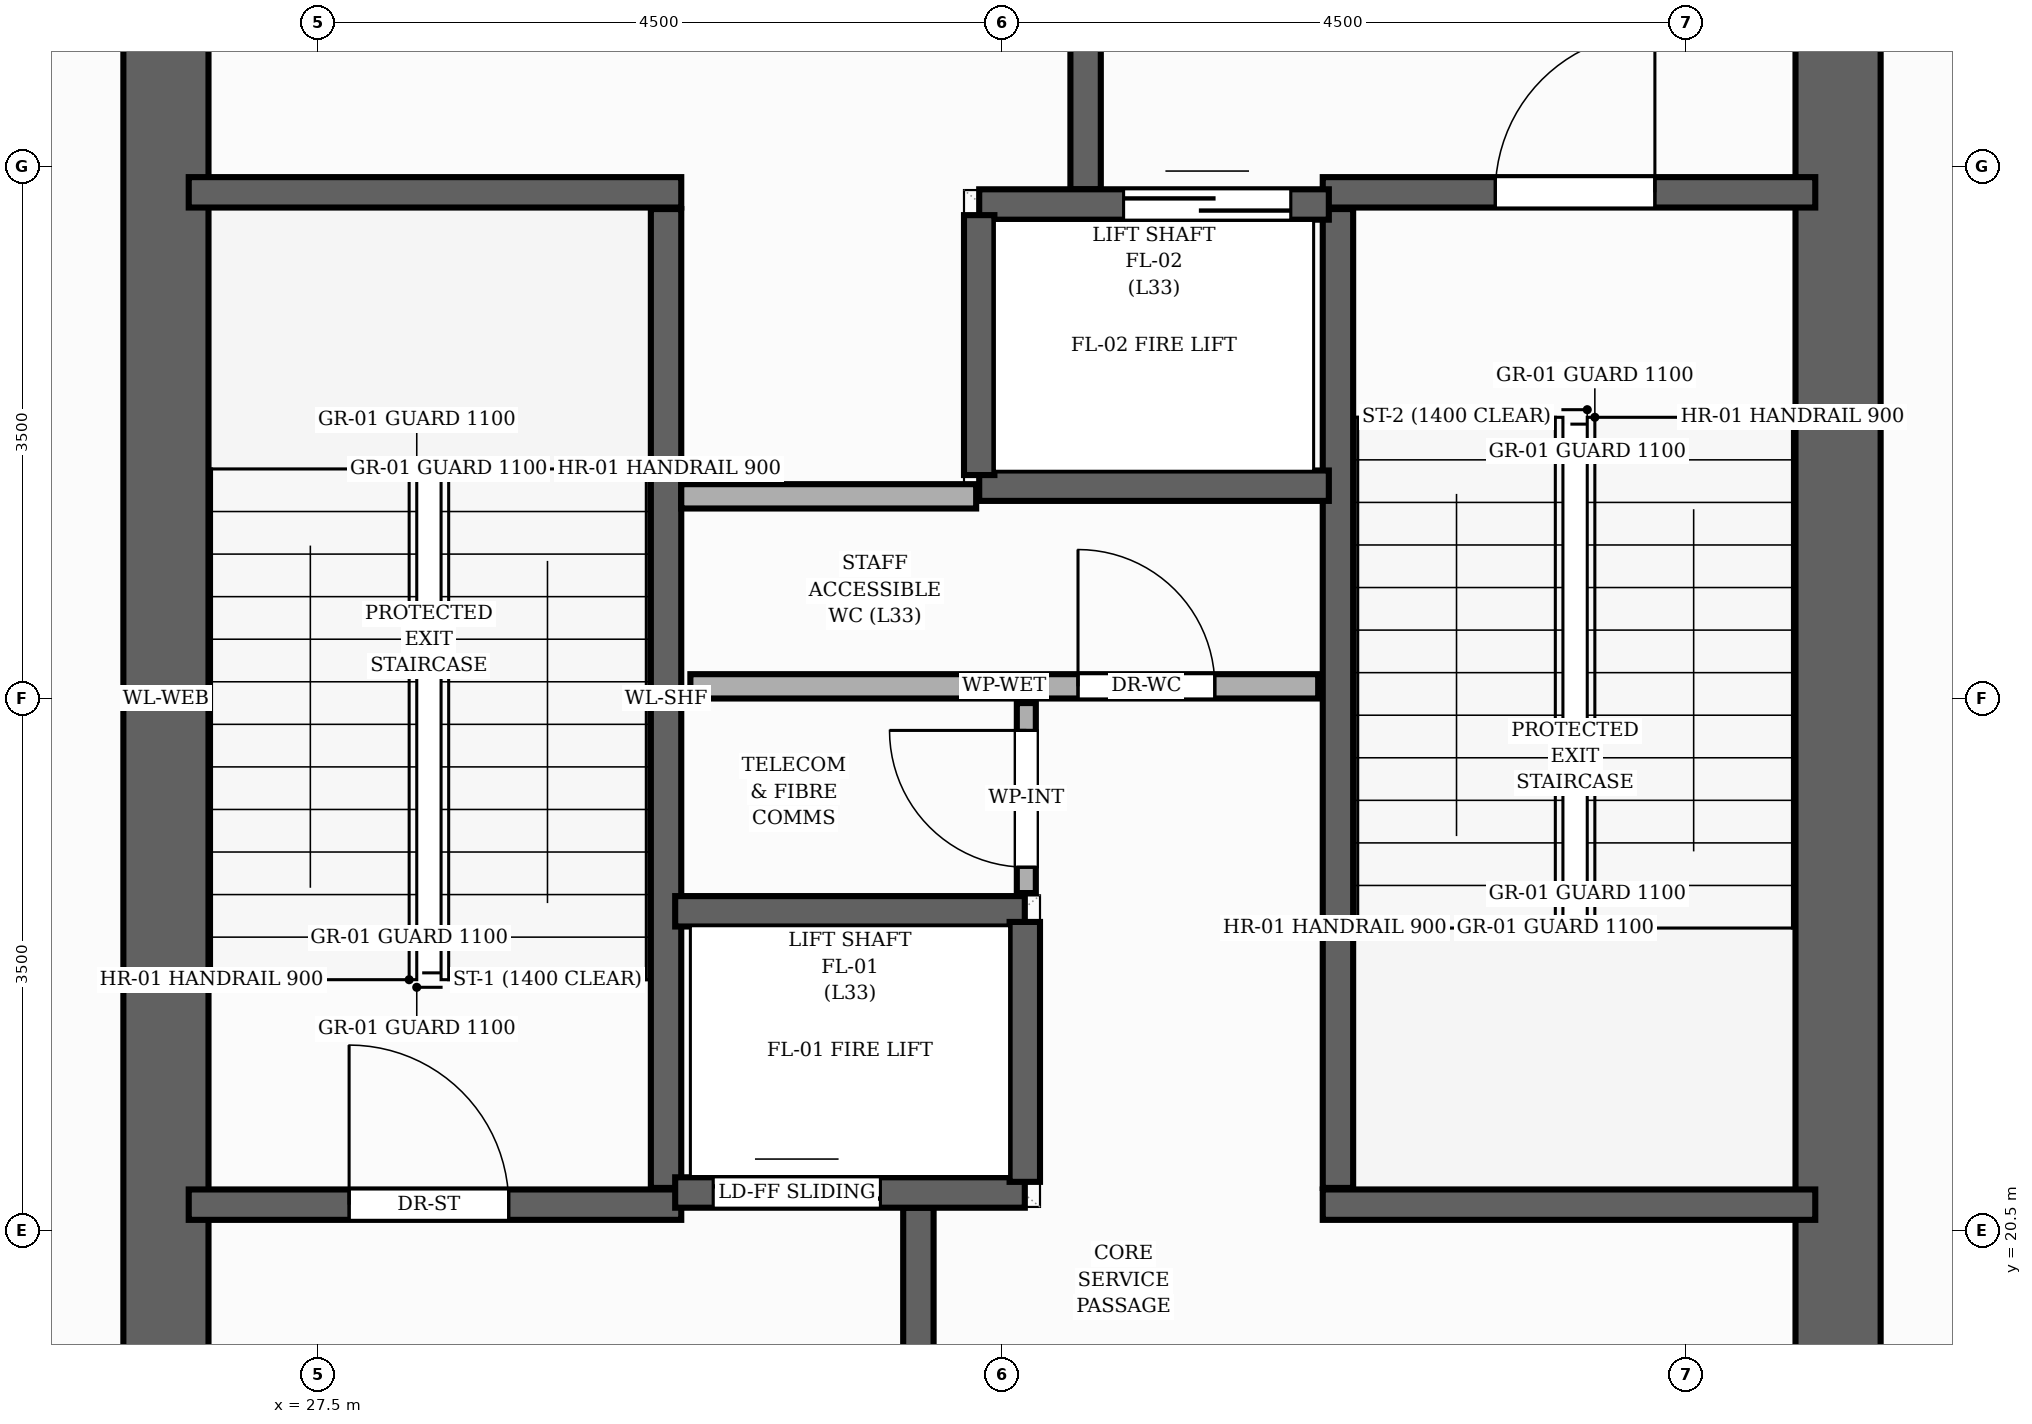
"""IFC4 building model, lengths in metres.
Left out: names, types, materials, properties, quantities, classifications, styles, units other than length and angle.
Written with IfcOpenShell. Run it as: python <this file> out.ifc"""

import sys

from ifc_helpers import new_model, si_unit, direction, frame, frame_2d, origin, place, context, subcontext, project, spatial, rectangle, extrude, element, fill, save


model = new_model("IFC4")
c1 = context("Model", 3, precision=1e-05, world=origin(), true_north=direction((0.0, 1.0)))
c2 = subcontext(c1, "Body", "Model", "MODEL_VIEW")
j1 = project(units=[si_unit("LENGTHUNIT", "METRE"), si_unit("PLANEANGLEUNIT", "RADIAN")], contexts=[c1])
p1 = place(None, origin())
s1 = spatial("IfcSite", under=j1, at=p1, CompositionType="ELEMENT")
p2 = place(p1, origin())
s2 = spatial("IfcBuilding", under=s1, at=p2, CompositionType="ELEMENT")
p3 = place(p2, frame((0.0, 0.0, 112.48)))
s3 = spatial("IfcBuildingStorey", under=s2, at=p3, CompositionType="ELEMENT", Elevation=112.48)
for number, where, z_axis, x_axis in (
    (1, (26.5, 17.35, 0.0), (0.0, 0.0, 1.0), (0.0, 1.0, 0.0)),
    (2, (37.5, 17.35, 0.0), (0.0, 0.0, 1.0), (0.0, 1.0, 0.0)),
):
    element("IfcWall", number, at=place(p3, frame(where, z_axis=z_axis, x_axis=x_axis)), inside=s3, PredefinedType="SHEAR", context=c2, shape_type="SweptSolid", body=[
        extrude(rectangle(XDim=13.3, YDim=0.56, at=frame_2d((6.65, 0.0))), origin(), (0.0, 0.0, 1.0), 4.48),
    ])
p4 = place(p3, frame((29.79, 20.78, 0.0), z_axis=(0.0, 0.0, 1.0), x_axis=(0.0, 1.0, 0.0)))
e3 = element("IfcWall", 3, at=p4, inside=s3, PredefinedType="SHEAR", context=c2, shape_type="SweptSolid", body=[
    extrude(rectangle(XDim=6.44, YDim=0.2, at=frame_2d((3.22, 0.0))), origin(), (0.0, 0.0, 1.0), 4.48),
])
p5 = place(p3, frame((26.65, 27.33, 0.0), z_axis=(0.0, 0.0, 1.0), x_axis=(1.0, 0.0, 0.0)))
e4 = element("IfcWall", 4, at=p5, inside=s3, PredefinedType="SHEAR", context=c2, shape_type="SweptSolid", body=[
    extrude(rectangle(XDim=3.24, YDim=0.2, at=frame_2d((1.62, 0.0))), origin(), (0.0, 0.0, 1.0), 4.48),
])
p6 = place(p3, frame((26.65, 20.67, 0.0), z_axis=(0.0, 0.0, 1.0), x_axis=(1.0, 0.0, 0.0)))
e5 = element("IfcWall", 5, at=p6, inside=s3, PredefinedType="SHEAR", context=c2, shape_type="SweptSolid", body=[
    extrude(rectangle(XDim=3.24, YDim=0.2, at=frame_2d((1.62, 0.0))), origin(), (0.0, 0.0, 1.0), 4.48),
])
p7 = place(p6, frame((1.055, 0.0, 0.0)))
e6 = element("IfcOpeningElement", 6, at=p7, cuts=e5, PredefinedType="OPENING", context=c2, shape_type="SweptSolid", body=[
    extrude(rectangle(XDim=1.05, YDim=2.15, at=frame_2d((0.525, 1.075))), frame((0.0, 0.11, 0.0), z_axis=(0.0, -1.0, 0.0), x_axis=(1.0, 0.0, 0.0)), (0.0, 0.0, 1.0), 0.22),
])
p8 = place(p3, frame((34.21, 20.78, 0.0), z_axis=(0.0, 0.0, 1.0), x_axis=(0.0, 1.0, 0.0)))
e7 = element("IfcWall", 7, at=p8, inside=s3, PredefinedType="SHEAR", context=c2, shape_type="SweptSolid", body=[
    extrude(rectangle(XDim=6.44, YDim=0.2, at=frame_2d((3.22, 0.0))), origin(), (0.0, 0.0, 1.0), 4.48),
])
p9 = place(p3, frame((34.11, 20.67, 0.0), z_axis=(0.0, 0.0, 1.0), x_axis=(1.0, 0.0, 0.0)))
e8 = element("IfcWall", 8, at=p9, inside=s3, PredefinedType="SHEAR", context=c2, shape_type="SweptSolid", body=[
    extrude(rectangle(XDim=3.24, YDim=0.2, at=frame_2d((1.62, 0.0))), origin(), (0.0, 0.0, 1.0), 4.48),
])
p10 = place(p3, frame((34.11, 27.33, 0.0), z_axis=(0.0, 0.0, 1.0), x_axis=(1.0, 0.0, 0.0)))
e9 = element("IfcWall", 9, at=p10, inside=s3, PredefinedType="SHEAR", context=c2, shape_type="SweptSolid", body=[
    extrude(rectangle(XDim=3.24, YDim=0.2, at=frame_2d((1.62, 0.0))), origin(), (0.0, 0.0, 1.0), 4.48),
])
p11 = place(p10, frame((1.135, 0.0, 0.0)))
e10 = element("IfcOpeningElement", 10, at=p11, cuts=e9, PredefinedType="OPENING", context=c2, shape_type="SweptSolid", body=[
    extrude(rectangle(XDim=1.05, YDim=2.15, at=frame_2d((0.525, 1.075))), frame((0.0, 0.11, 0.0), z_axis=(0.0, -1.0, 0.0), x_axis=(1.0, 0.0, 0.0)), (0.0, 0.0, 1.0), 0.22),
])
for number, where, z_axis, x_axis in (
    (11, (31.45, 17.15, 0.0), (0.0, 0.0, 1.0), (0.0, 1.0, 0.0)),
    (12, (32.55, 27.35, 0.0), (0.0, 0.0, 1.0), (0.0, 1.0, 0.0)),
):
    element("IfcWall", number, at=place(p3, frame(where, z_axis=z_axis, x_axis=x_axis)), inside=s3, PredefinedType="SHEAR", context=c2, shape_type="SweptSolid", body=[
        extrude(rectangle(XDim=3.5, YDim=0.2, at=frame_2d((1.75, 0.0))), origin(), (0.0, 0.0, 1.0), 4.48),
    ])
p12 = place(p3, frame((29.85, 20.75, 0.0), z_axis=(0.0, 0.0, 1.0), x_axis=(1.0, 0.0, 0.0)))
e13 = element("IfcWall", 13, at=p12, inside=s3, PredefinedType="SHEAR", context=c2, shape_type="SweptSolid", body=[
    extrude(rectangle(XDim=2.3, YDim=0.2, at=frame_2d((1.15, 0.0))), origin(), (0.0, 0.0, 1.0), 4.48),
])
p13 = place(p12, frame((0.25, 0.0, 0.0)))
e14 = element("IfcOpeningElement", 14, at=p13, cuts=e13, PredefinedType="OPENING", context=c2, shape_type="SweptSolid", body=[
    extrude(rectangle(XDim=1.1, YDim=2.15, at=frame_2d((0.55, 1.075))), frame((0.0, 0.11, 0.0), z_axis=(0.0, -1.0, 0.0), x_axis=(1.0, 0.0, 0.0)), (0.0, 0.0, 1.0), 0.22),
])
p14 = place(p3, frame((29.85, 22.6, 0.0), z_axis=(0.0, 0.0, 1.0), x_axis=(1.0, 0.0, 0.0)))
e15 = element("IfcWall", 15, at=p14, inside=s3, PredefinedType="SHEAR", context=c2, shape_type="SweptSolid", body=[
    extrude(rectangle(XDim=2.3, YDim=0.2, at=frame_2d((1.15, 0.0))), origin(), (0.0, 0.0, 1.0), 4.48),
])
p15 = place(p3, frame((32.15, 20.82, 0.0), z_axis=(0.0, 0.0, 1.0), x_axis=(0.0, 1.0, 0.0)))
e16 = element("IfcWall", 16, at=p15, inside=s3, PredefinedType="SHEAR", context=c2, shape_type="SweptSolid", body=[
    extrude(rectangle(XDim=1.71, YDim=0.2, at=frame_2d((0.855, 0.0))), origin(), (0.0, 0.0, 1.0), 4.48),
])
p16 = place(p3, frame((31.85, 27.25, 0.0), z_axis=(0.0, 0.0, 1.0), x_axis=(1.0, 0.0, 0.0)))
e17 = element("IfcWall", 17, at=p16, inside=s3, PredefinedType="SHEAR", context=c2, shape_type="SweptSolid", body=[
    extrude(rectangle(XDim=2.3, YDim=0.2, at=frame_2d((1.15, 0.0))), origin(), (0.0, 0.0, 1.0), 4.48),
])
p17 = place(p16, frame((0.95, 0.0, 0.0)))
e18 = element("IfcOpeningElement", 18, at=p17, cuts=e17, PredefinedType="OPENING", context=c2, shape_type="SweptSolid", body=[
    extrude(rectangle(XDim=1.1, YDim=2.15, at=frame_2d((0.55, 1.075))), frame((0.0, 0.11, 0.0), z_axis=(0.0, -1.0, 0.0), x_axis=(1.0, 0.0, 0.0)), (0.0, 0.0, 1.0), 0.22),
])
p18 = place(p3, frame((31.85, 25.4, 0.0), z_axis=(0.0, 0.0, 1.0), x_axis=(1.0, 0.0, 0.0)))
e19 = element("IfcWall", 19, at=p18, inside=s3, PredefinedType="SHEAR", context=c2, shape_type="SweptSolid", body=[
    extrude(rectangle(XDim=2.3, YDim=0.2, at=frame_2d((1.15, 0.0))), origin(), (0.0, 0.0, 1.0), 4.48),
])
p19 = place(p3, frame((31.85, 25.47, 0.0), z_axis=(0.0, 0.0, 1.0), x_axis=(0.0, 1.0, 0.0)))
e20 = element("IfcWall", 20, at=p19, inside=s3, PredefinedType="SHEAR", context=c2, shape_type="SweptSolid", body=[
    extrude(rectangle(XDim=1.71, YDim=0.2, at=frame_2d((0.855, 0.0))), origin(), (0.0, 0.0, 1.0), 4.48),
])
p20 = place(p3, frame((29.95, 24.08, 0.0), z_axis=(0.0, 0.0, 1.0), x_axis=(1.0, 0.0, 0.0)))
e21 = element("IfcWall", 21, at=p20, inside=s3, PredefinedType="PLUMBINGWALL", context=c2, shape_type="SweptSolid", body=[
    extrude(rectangle(XDim=4.13, YDim=0.16, at=frame_2d((2.065, 0.0))), origin(), (0.0, 0.0, 1.0), 4.235),
])
p21 = place(p20, frame((2.55, 0.0, 0.0)))
e22 = element("IfcOpeningElement", 22, at=p21, cuts=e21, PredefinedType="OPENING", context=c2, shape_type="SweptSolid", body=[
    extrude(rectangle(XDim=0.9, YDim=2.1, at=frame_2d((0.45, 1.05))), frame((0.0, 0.09, 0.0), z_axis=(0.0, -1.0, 0.0), x_axis=(1.0, 0.0, 0.0)), (0.0, 0.0, 1.0), 0.18),
])
p22 = place(p3, frame((32.16, 22.72, 0.0), z_axis=(0.0, 0.0, 1.0), x_axis=(0.0, 1.0, 0.0)))
e23 = element("IfcWall", 23, at=p22, inside=s3, PredefinedType="PARTITIONING", context=c2, shape_type="SweptSolid", body=[
    extrude(rectangle(XDim=1.25, YDim=0.125, at=frame_2d((0.625, 0.0))), origin(), (0.0, 0.0, 1.0), 4.235),
])
p23 = place(p22, frame((0.17, 0.0, 0.0)))
e24 = element("IfcOpeningElement", 24, at=p23, cuts=e23, PredefinedType="OPENING", context=c2, shape_type="SweptSolid", body=[
    extrude(rectangle(XDim=0.9, YDim=2.1, at=frame_2d((0.45, 1.05))), frame((0.0, 0.073, 0.0), z_axis=(0.0, -1.0, 0.0), x_axis=(1.0, 0.0, 0.0)), (0.0, 0.0, 1.0), 0.145),
])
p24 = place(p3, frame((29.89, 25.33, 0.0), z_axis=(0.0, 0.0, 1.0), x_axis=(1.0, 0.0, 0.0)))
e25 = element("IfcWall", 25, at=p24, inside=s3, PredefinedType="PLUMBINGWALL", context=c2, shape_type="SweptSolid", body=[
    extrude(rectangle(XDim=1.94, YDim=0.16, at=frame_2d((0.97, 0.0))), origin(), (0.0, 0.0, 1.0), 4.235),
])
p25 = place(p7, origin())
e26 = element("IfcDoor", 26, at=p25, inside=s3, OperationType="SINGLE_SWING_LEFT", PredefinedType="DOOR", context=c2, shape_type="SweptSolid", body=[
    extrude(rectangle(XDim=1.05, YDim=2.15, at=frame_2d((0.525, 1.075))), frame((0.0, 0.025, 0.0), z_axis=(0.0, -1.0, 0.0), x_axis=(1.0, 0.0, 0.0)), (0.0, 0.0, 1.0), 0.05),
])
fill(e6, e26)
p26 = place(p11, origin())
e27 = element("IfcDoor", 27, at=p26, inside=s3, OperationType="SINGLE_SWING_RIGHT", PredefinedType="DOOR", context=c2, shape_type="SweptSolid", body=[
    extrude(rectangle(XDim=1.05, YDim=2.15, at=frame_2d((0.525, 1.075))), frame((0.0, 0.025, 0.0), z_axis=(0.0, -1.0, 0.0), x_axis=(1.0, 0.0, 0.0)), (0.0, 0.0, 1.0), 0.05),
])
fill(e10, e27)
p27 = place(p13, origin())
e28 = element("IfcDoor", 28, at=p27, inside=s3, OperationType="DOUBLE_DOOR_SLIDING", PredefinedType="DOOR", context=c2, shape_type="SweptSolid", body=[
    extrude(rectangle(XDim=1.1, YDim=2.15, at=frame_2d((0.55, 1.075))), frame((0.0, 0.025, 0.0), z_axis=(0.0, -1.0, 0.0), x_axis=(1.0, 0.0, 0.0)), (0.0, 0.0, 1.0), 0.05),
])
fill(e14, e28)
p28 = place(p17, origin())
e29 = element("IfcDoor", 29, at=p28, inside=s3, OperationType="DOUBLE_DOOR_SLIDING", PredefinedType="DOOR", context=c2, shape_type="SweptSolid", body=[
    extrude(rectangle(XDim=1.1, YDim=2.15, at=frame_2d((0.55, 1.075))), frame((0.0, 0.025, 0.0), z_axis=(0.0, -1.0, 0.0), x_axis=(1.0, 0.0, 0.0)), (0.0, 0.0, 1.0), 0.05),
])
fill(e18, e29)
p29 = place(p21, origin())
e30 = element("IfcDoor", 30, at=p29, inside=s3, OperationType="SINGLE_SWING_LEFT", PredefinedType="DOOR", context=c2, shape_type="SweptSolid", body=[
    extrude(rectangle(XDim=0.9, YDim=2.1, at=frame_2d((0.45, 1.05))), frame((0.0, 0.025, 0.0), z_axis=(0.0, -1.0, 0.0), x_axis=(1.0, 0.0, 0.0)), (0.0, 0.0, 1.0), 0.05),
])
fill(e22, e30)
p30 = place(p23, origin())
e31 = element("IfcDoor", 31, at=p30, inside=s3, OperationType="SINGLE_SWING_RIGHT", PredefinedType="DOOR", context=c2, shape_type="SweptSolid", body=[
    extrude(rectangle(XDim=0.9, YDim=2.1, at=frame_2d((0.45, 1.05))), frame((0.0, 0.025, 0.0), z_axis=(0.0, -1.0, 0.0), x_axis=(1.0, 0.0, 0.0)), (0.0, 0.0, 1.0), 0.05),
])
fill(e24, e31)
save(model, sys.argv[1])
